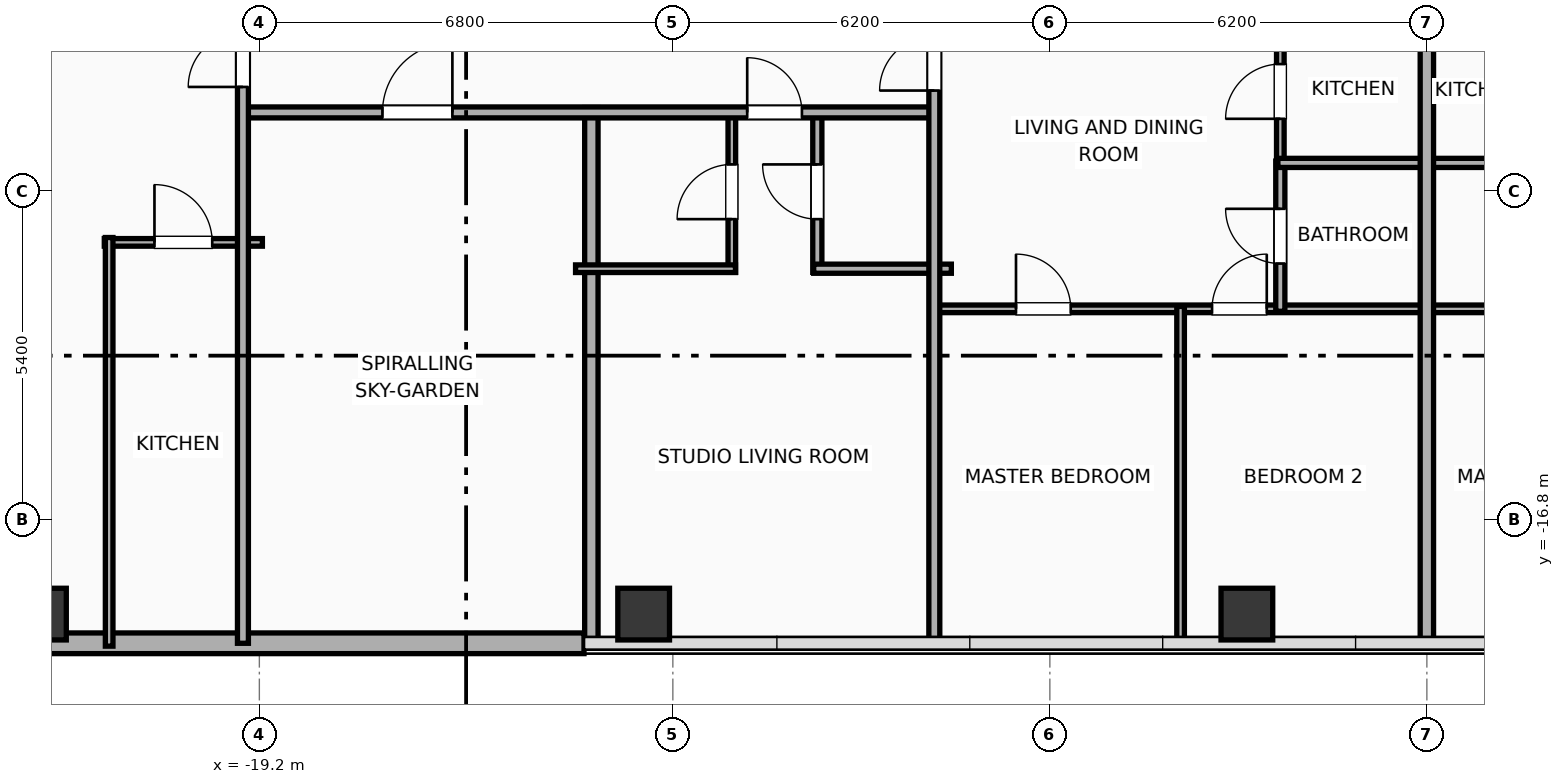
"""IFC4 building model, lengths in metres.
Left out: names, types, materials, properties, quantities, classifications, styles, units other than length and angle.
Written with IfcOpenShell. Run it as: python <this file> out.ifc"""

import sys

from ifc_helpers import new_model, si_unit, direction, frame, frame_2d, origin, origin_2d, place, context, subcontext, project, spatial, rectangle, hollow_rectangle, extrude, element, fill, save


model = new_model("IFC4")
c1 = context("Model", 3, precision=1e-05, world=origin(), true_north=direction((0.0, 1.0)))
c2 = subcontext(c1, "Body", "Model", "MODEL_VIEW")
j1 = project(units=[si_unit("LENGTHUNIT", "METRE"), si_unit("PLANEANGLEUNIT", "RADIAN")], contexts=[c1])
p1 = place(None, origin())
s1 = spatial("IfcSite", under=j1, at=p1, CompositionType="ELEMENT")
p2 = place(p1, origin())
s2 = spatial("IfcBuilding", under=s1, at=p2, CompositionType="ELEMENT")
p3 = place(p2, frame((0.0, 0.0, 200.2)))
s3 = spatial("IfcBuildingStorey", under=s2, at=p3, CompositionType="ELEMENT", Elevation=200.2)
for number, where, z_axis, x_axis in (
    (1, (-22.8, -18.35, 0.0), (0.0, 0.0, 1.0), (1.0, 0.0, 0.0)),
    (2, (-12.88, -18.35, 0.0), (0.0, 0.0, 1.0), (1.0, 0.0, 0.0)),
    (3, (-2.96, -18.35, 0.0), (0.0, 0.0, 1.0), (1.0, 0.0, 0.0)),
):
    element("IfcColumn", number, at=place(p3, frame(where, z_axis=z_axis, x_axis=x_axis)), inside=s3, PredefinedType="COLUMN", context=c2, shape_type="SweptSolid", body=[
        extrude(hollow_rectangle(XDim=0.85, YDim=0.85, WallThickness=0.028, at=origin_2d()), origin(), (0.0, 0.0, 1.0), 3.9),
    ])
p4 = place(p3, frame((-13.861, -18.83, 0.0), z_axis=(0.0, 0.0, 1.0), x_axis=(-1.0, 0.0, 0.0)))
e4 = element("IfcWall", 4, at=p4, inside=s3, PredefinedType="ELEMENTEDWALL", context=c2, shape_type="SweptSolid", body=[
    extrude(rectangle(XDim=8.922, YDim=0.34, at=frame_2d((4.461, 0.0))), origin(), (0.0, 0.0, 1.0), 2.54),
])
p5 = place(p3, frame((-13.74, -18.83, 0.0), z_axis=(0.0, 0.0, 1.0), x_axis=(0.0, 1.0, 0.0)))
e5 = element("IfcWall", 5, at=p5, inside=s3, PredefinedType="PARTITIONING", context=c2, shape_type="SweptSolid", body=[
    extrude(rectangle(XDim=8.81, YDim=0.22, at=frame_2d((4.405, 0.0))), origin(), (0.0, 0.0, 1.0), 3.65),
])
p6 = place(p3, frame((-11.43, -12.73, 0.0), z_axis=(0.0, 0.0, 1.0), x_axis=(0.0, 1.0, 0.0)))
e6 = element("IfcWall", 6, at=p6, inside=s3, PredefinedType="PARTITIONING", context=c2, shape_type="SweptSolid", body=[
    extrude(rectangle(XDim=2.65, YDim=0.125, at=frame_2d((1.325, 0.0))), origin(), (0.0, 0.0, 1.0), 3.65),
])
p7 = place(p6, frame((0.875, 0.0, 0.0)))
e7 = element("IfcOpeningElement", 7, at=p7, cuts=e6, PredefinedType="OPENING", context=c2, shape_type="SweptSolid", body=[
    extrude(rectangle(XDim=0.9, YDim=2.05, at=frame_2d((0.45, 1.025))), frame((0.0, 0.073, 0.0), z_axis=(0.0, -1.0, 0.0), x_axis=(1.0, 0.0, 0.0)), (0.0, 0.0, 1.0), 0.145),
])
p8 = place(p3, frame((-10.024, -12.73, 0.0), z_axis=(0.0, 0.0, 1.0), x_axis=(0.0, 1.0, 0.0)))
e8 = element("IfcWall", 8, at=p8, inside=s3, PredefinedType="PLUMBINGWALL", context=c2, shape_type="SweptSolid", body=[
    extrude(rectangle(XDim=2.65, YDim=0.15, at=frame_2d((1.325, 0.0))), origin(), (0.0, 0.0, 1.0), 3.65),
])
p9 = place(p8, frame((0.875, 0.0, 0.0)))
e9 = element("IfcOpeningElement", 9, at=p9, cuts=e8, PredefinedType="OPENING", context=c2, shape_type="SweptSolid", body=[
    extrude(rectangle(XDim=0.9, YDim=2.05, at=frame_2d((0.45, 1.025))), frame((0.0, 0.085, 0.0), z_axis=(0.0, -1.0, 0.0), x_axis=(1.0, 0.0, 0.0)), (0.0, 0.0, 1.0), 0.17),
])
p10 = place(p3, frame((-14.0, -12.67, 0.0), z_axis=(0.0, 0.0, 1.0), x_axis=(1.0, 0.0, 0.0)))
e10 = element("IfcWall", 10, at=p10, inside=s3, PredefinedType="PARTITIONING", context=c2, shape_type="SweptSolid", body=[
    extrude(rectangle(XDim=2.63, YDim=0.125, at=frame_2d((1.315, 0.0))), origin(), (0.0, 0.0, 1.0), 3.65),
])
p11 = place(p3, frame((-10.084, -12.67, 0.0), z_axis=(0.0, 0.0, 1.0), x_axis=(1.0, 0.0, 0.0)))
e11 = element("IfcWall", 11, at=p11, inside=s3, PredefinedType="PLUMBINGWALL", context=c2, shape_type="SweptSolid", body=[
    extrude(rectangle(XDim=2.264, YDim=0.15, at=frame_2d((1.132, 0.0))), origin(), (0.0, 0.0, 1.0), 3.65),
])
p12 = place(p3, frame((-19.5, -10.1, 0.0), z_axis=(0.0, 0.0, 1.0), x_axis=(1.0, 0.0, 0.0)))
e12 = element("IfcWall", 12, at=p12, inside=s3, PredefinedType="PARTITIONING", context=c2, shape_type="SweptSolid", body=[
    extrude(rectangle(XDim=11.42, YDim=0.18, at=frame_2d((5.71, 0.0))), origin(), (0.0, 0.0, 1.0), 3.65),
])
p13 = place(p12, frame((2.324, 0.0, 0.0)))
e13 = element("IfcOpeningElement", 13, at=p13, cuts=e12, PredefinedType="OPENING", context=c2, shape_type="SweptSolid", body=[
    extrude(rectangle(XDim=1.15, YDim=2.05, at=frame_2d((0.575, 1.025))), frame((0.0, 0.1, 0.0), z_axis=(0.0, -1.0, 0.0), x_axis=(1.0, 0.0, 0.0)), (0.0, 0.0, 1.0), 0.2),
])
p14 = place(p12, frame((8.323, 0.0, 0.0)))
e14 = element("IfcOpeningElement", 14, at=p14, cuts=e12, PredefinedType="OPENING", context=c2, shape_type="SweptSolid", body=[
    extrude(rectangle(XDim=0.9, YDim=2.05, at=frame_2d((0.45, 1.025))), frame((0.0, 0.1, 0.0), z_axis=(0.0, -1.0, 0.0), x_axis=(1.0, 0.0, 0.0)), (0.0, 0.0, 1.0), 0.2),
])
p15 = place(p3, frame((-8.08, -13.33, 0.0), z_axis=(0.0, 0.0, 1.0), x_axis=(1.0, 0.0, 0.0)))
e15 = element("IfcWall", 15, at=p15, inside=s3, PredefinedType="PARTITIONING", context=c2, shape_type="SweptSolid", body=[
    extrude(rectangle(XDim=8.06, YDim=0.125, at=frame_2d((4.03, 0.0))), origin(), (0.0, 0.0, 1.0), 3.65),
])
p16 = place(p15, frame((1.323, 0.0, 0.0)))
e16 = element("IfcOpeningElement", 16, at=p16, cuts=e15, PredefinedType="OPENING", context=c2, shape_type="SweptSolid", body=[
    extrude(rectangle(XDim=0.9, YDim=2.05, at=frame_2d((0.45, 1.025))), frame((0.0, 0.073, 0.0), z_axis=(0.0, -1.0, 0.0), x_axis=(1.0, 0.0, 0.0)), (0.0, 0.0, 1.0), 0.145),
])
p17 = place(p15, frame((4.547, 0.0, 0.0)))
e17 = element("IfcOpeningElement", 17, at=p17, cuts=e15, PredefinedType="OPENING", context=c2, shape_type="SweptSolid", body=[
    extrude(rectangle(XDim=0.9, YDim=2.05, at=frame_2d((0.45, 1.025))), frame((0.0, 0.073, 0.0), z_axis=(0.0, -1.0, 0.0), x_axis=(1.0, 0.0, 0.0)), (0.0, 0.0, 1.0), 0.145),
])
p18 = place(p3, frame((-2.41, -10.96, 0.0), z_axis=(0.0, 0.0, 1.0), x_axis=(0.0, 1.0, 0.0)))
e18 = element("IfcWall", 18, at=p18, inside=s3, PredefinedType="PARTITIONING", context=c2, shape_type="SweptSolid", body=[
    extrude(rectangle(XDim=2.41, YDim=0.125, at=frame_2d((1.205, 0.0))), origin(), (0.0, 0.0, 1.0), 3.65),
])
p19 = place(p18, frame((0.755, 0.0, 0.0)))
e19 = element("IfcOpeningElement", 19, at=p19, cuts=e18, PredefinedType="OPENING", context=c2, shape_type="SweptSolid", body=[
    extrude(rectangle(XDim=0.9, YDim=2.05, at=frame_2d((0.45, 1.025))), frame((0.0, 0.073, 0.0), z_axis=(0.0, -1.0, 0.0), x_axis=(1.0, 0.0, 0.0)), (0.0, 0.0, 1.0), 0.145),
])
p20 = place(p3, frame((-2.41, -13.37, 0.0), z_axis=(0.0, 0.0, 1.0), x_axis=(0.0, 1.0, 0.0)))
e20 = element("IfcWall", 20, at=p20, inside=s3, PredefinedType="PLUMBINGWALL", context=c2, shape_type="SweptSolid", body=[
    extrude(rectangle(XDim=2.47, YDim=0.15, at=frame_2d((1.235, 0.0))), origin(), (0.0, 0.0, 1.0), 3.65),
])
p21 = place(p20, frame((0.785, 0.0, 0.0)))
e21 = element("IfcOpeningElement", 21, at=p21, cuts=e20, PredefinedType="OPENING", context=c2, shape_type="SweptSolid", body=[
    extrude(rectangle(XDim=0.9, YDim=2.05, at=frame_2d((0.45, 1.025))), frame((0.0, 0.085, 0.0), z_axis=(0.0, -1.0, 0.0), x_axis=(1.0, 0.0, 0.0)), (0.0, 0.0, 1.0), 0.17),
])
p22 = place(p3, frame((-2.45, -10.93, 0.0), z_axis=(0.0, 0.0, 1.0), x_axis=(1.0, 0.0, 0.0)))
e22 = element("IfcWall", 22, at=p22, inside=s3, PredefinedType="PLUMBINGWALL", context=c2, shape_type="SweptSolid", body=[
    extrude(rectangle(XDim=2.43, YDim=0.15, at=frame_2d((1.215, 0.0))), origin(), (0.0, 0.0, 1.0), 3.65),
])
p23 = place(p3, frame((-4.05, -18.83, 0.0), z_axis=(0.0, 0.0, 1.0), x_axis=(0.0, 1.0, 0.0)))
e23 = element("IfcWall", 23, at=p23, inside=s3, PredefinedType="PARTITIONING", context=c2, shape_type="SweptSolid", body=[
    extrude(rectangle(XDim=5.54, YDim=0.125, at=frame_2d((2.77, 0.0))), origin(), (0.0, 0.0, 1.0), 2.54),
])
p24 = place(p3, frame((-8.1, -18.83, 0.0), z_axis=(0.0, 0.0, 1.0), x_axis=(0.0, 1.0, 0.0)))
e24 = element("IfcWall", 24, at=p24, inside=s3, PredefinedType="PARTITIONING", context=c2, shape_type="SweptSolid", body=[
    extrude(rectangle(XDim=10.34, YDim=0.18, at=frame_2d((5.17, 0.0))), origin(), (0.0, 0.0, 1.0), 3.65),
])
p25 = place(p24, frame((9.09, 0.0, 0.0)))
e25 = element("IfcOpeningElement", 25, at=p25, cuts=e24, PredefinedType="OPENING", context=c2, shape_type="SweptSolid", body=[
    extrude(rectangle(XDim=0.9, YDim=2.05, at=frame_2d((0.45, 1.025))), frame((0.0, 0.1, 0.0), z_axis=(0.0, -1.0, 0.0), x_axis=(1.0, 0.0, 0.0)), (0.0, 0.0, 1.0), 0.2),
])
p26 = place(p3, frame((0.02, -13.33, 0.0), z_axis=(0.0, 0.0, 1.0), x_axis=(1.0, 0.0, 0.0)))
e26 = element("IfcWall", 26, at=p26, inside=s3, PredefinedType="PARTITIONING", context=c2, shape_type="SweptSolid", body=[
    extrude(rectangle(XDim=8.06, YDim=0.125, at=frame_2d((4.03, 0.0))), origin(), (0.0, 0.0, 1.0), 3.65),
])
p27 = place(p26, frame((1.323, 0.0, 0.0)))
e27 = element("IfcOpeningElement", 27, at=p27, cuts=e26, PredefinedType="OPENING", context=c2, shape_type="SweptSolid", body=[
    extrude(rectangle(XDim=0.9, YDim=2.05, at=frame_2d((0.45, 1.025))), frame((0.0, 0.073, 0.0), z_axis=(0.0, -1.0, 0.0), x_axis=(1.0, 0.0, 0.0)), (0.0, 0.0, 1.0), 0.145),
])
p28 = place(p26, frame((5.837, 0.0, 0.0)))
e28 = element("IfcOpeningElement", 28, at=p28, cuts=e26, PredefinedType="OPENING", context=c2, shape_type="SweptSolid", body=[
    extrude(rectangle(XDim=0.9, YDim=2.05, at=frame_2d((0.45, 1.025))), frame((0.0, 0.073, 0.0), z_axis=(0.0, -1.0, 0.0), x_axis=(1.0, 0.0, 0.0)), (0.0, 0.0, 1.0), 0.145),
])
p29 = place(p3, frame((0.02, -10.93, 0.0), z_axis=(0.0, 0.0, 1.0), x_axis=(1.0, 0.0, 0.0)))
e29 = element("IfcWall", 29, at=p29, inside=s3, PredefinedType="PLUMBINGWALL", context=c2, shape_type="SweptSolid", body=[
    extrude(rectangle(XDim=2.43, YDim=0.15, at=frame_2d((1.215, 0.0))), origin(), (0.0, 0.0, 1.0), 3.65),
])
p30 = place(p3, frame((0.0, -18.83, 0.0), z_axis=(0.0, 0.0, 1.0), x_axis=(0.0, 1.0, 0.0)))
e30 = element("IfcWall", 30, at=p30, inside=s3, PredefinedType="PARTITIONING", context=c2, shape_type="SweptSolid", body=[
    extrude(rectangle(XDim=10.34, YDim=0.22, at=frame_2d((5.17, 0.0))), origin(), (0.0, 0.0, 1.0), 3.65),
])
p31 = place(p3, frame((-21.75, -12.237, 0.0), z_axis=(0.0, 0.0, 1.0), x_axis=(1.0, 0.0, 0.0)))
e31 = element("IfcWall", 31, at=p31, inside=s3, PredefinedType="PARTITIONING", context=c2, shape_type="SweptSolid", body=[
    extrude(rectangle(XDim=2.6, YDim=0.125, at=frame_2d((1.3, 0.0))), origin(), (0.0, 0.0, 1.0), 3.65),
])
p32 = place(p31, frame((0.825, 0.0, 0.0)))
e32 = element("IfcOpeningElement", 32, at=p32, cuts=e31, PredefinedType="OPENING", context=c2, shape_type="SweptSolid", body=[
    extrude(rectangle(XDim=0.95, YDim=2.05, at=frame_2d((0.475, 1.025))), frame((0.0, 0.073, 0.0), z_axis=(0.0, -1.0, 0.0), x_axis=(1.0, 0.0, 0.0)), (0.0, 0.0, 1.0), 0.145),
])
p33 = place(p3, frame((-21.67, -18.877, 0.0), z_axis=(0.0, 0.0, 1.0), x_axis=(0.0, 1.0, 0.0)))
e33 = element("IfcWall", 33, at=p33, inside=s3, PredefinedType="PARTITIONING", context=c2, shape_type="SweptSolid", body=[
    extrude(rectangle(XDim=6.72, YDim=0.125, at=frame_2d((3.36, 0.0))), origin(), (0.0, 0.0, 1.0), 2.54),
])
p34 = place(p3, frame((-19.47, -18.83, 0.0), z_axis=(0.0, 0.0, 1.0), x_axis=(0.0, 1.0, 0.0)))
e34 = element("IfcWall", 34, at=p34, inside=s3, PredefinedType="PARTITIONING", context=c2, shape_type="SweptSolid", body=[
    extrude(rectangle(XDim=20.63, YDim=0.18, at=frame_2d((10.315, 0.0))), origin(), (0.0, 0.0, 1.0), 2.54),
])
p35 = place(p34, frame((9.149, 0.0, 0.0)))
e35 = element("IfcOpeningElement", 35, at=p35, cuts=e34, PredefinedType="OPENING", context=c2, shape_type="SweptSolid", body=[
    extrude(rectangle(XDim=0.9, YDim=2.05, at=frame_2d((0.45, 1.025))), frame((0.0, 0.1, 0.0), z_axis=(0.0, -1.0, 0.0), x_axis=(1.0, 0.0, 0.0)), (0.0, 0.0, 1.0), 0.2),
])
p36 = place(p7, origin())
e36 = element("IfcDoor", 36, at=p36, inside=s3, OperationType="SINGLE_SWING_LEFT", PredefinedType="DOOR", context=c2, shape_type="SweptSolid", body=[
    extrude(rectangle(XDim=0.9, YDim=2.05, at=frame_2d((0.45, 1.025))), frame((0.0, 0.025, 0.0), z_axis=(0.0, -1.0, 0.0), x_axis=(1.0, 0.0, 0.0)), (0.0, 0.0, 1.0), 0.05),
])
fill(e7, e36)
p37 = place(p9, origin())
e37 = element("IfcDoor", 37, at=p37, inside=s3, OperationType="SINGLE_SWING_RIGHT", PredefinedType="DOOR", context=c2, shape_type="SweptSolid", body=[
    extrude(rectangle(XDim=0.9, YDim=2.05, at=frame_2d((0.45, 1.025))), frame((0.0, 0.025, 0.0), z_axis=(0.0, -1.0, 0.0), x_axis=(1.0, 0.0, 0.0)), (0.0, 0.0, 1.0), 0.05),
])
fill(e9, e37)
p38 = place(p13, origin())
e38 = element("IfcDoor", 38, at=p38, inside=s3, OperationType="SINGLE_SWING_RIGHT", PredefinedType="DOOR", context=c2, shape_type="SweptSolid", body=[
    extrude(rectangle(XDim=1.15, YDim=2.05, at=frame_2d((0.575, 1.025))), frame((0.0, 0.025, 0.0), z_axis=(0.0, -1.0, 0.0), x_axis=(1.0, 0.0, 0.0)), (0.0, 0.0, 1.0), 0.05),
])
fill(e13, e38)
p39 = place(p14, origin())
e39 = element("IfcDoor", 39, at=p39, inside=s3, OperationType="SINGLE_SWING_LEFT", PredefinedType="DOOR", context=c2, shape_type="SweptSolid", body=[
    extrude(rectangle(XDim=0.9, YDim=2.05, at=frame_2d((0.45, 1.025))), frame((0.0, 0.025, 0.0), z_axis=(0.0, -1.0, 0.0), x_axis=(1.0, 0.0, 0.0)), (0.0, 0.0, 1.0), 0.05),
])
fill(e14, e39)
p40 = place(p16, origin())
e40 = element("IfcDoor", 40, at=p40, inside=s3, OperationType="SINGLE_SWING_LEFT", PredefinedType="DOOR", context=c2, shape_type="SweptSolid", body=[
    extrude(rectangle(XDim=0.9, YDim=2.05, at=frame_2d((0.45, 1.025))), frame((0.0, 0.025, 0.0), z_axis=(0.0, -1.0, 0.0), x_axis=(1.0, 0.0, 0.0)), (0.0, 0.0, 1.0), 0.05),
])
fill(e16, e40)
p41 = place(p17, origin())
e41 = element("IfcDoor", 41, at=p41, inside=s3, OperationType="SINGLE_SWING_RIGHT", PredefinedType="DOOR", context=c2, shape_type="SweptSolid", body=[
    extrude(rectangle(XDim=0.9, YDim=2.05, at=frame_2d((0.45, 1.025))), frame((0.0, 0.025, 0.0), z_axis=(0.0, -1.0, 0.0), x_axis=(1.0, 0.0, 0.0)), (0.0, 0.0, 1.0), 0.05),
])
fill(e17, e41)
p42 = place(p19, origin())
e42 = element("IfcDoor", 42, at=p42, inside=s3, OperationType="SINGLE_SWING_LEFT", PredefinedType="DOOR", context=c2, shape_type="SweptSolid", body=[
    extrude(rectangle(XDim=0.9, YDim=2.05, at=frame_2d((0.45, 1.025))), frame((0.0, 0.025, 0.0), z_axis=(0.0, -1.0, 0.0), x_axis=(1.0, 0.0, 0.0)), (0.0, 0.0, 1.0), 0.05),
])
fill(e19, e42)
p43 = place(p21, origin())
e43 = element("IfcDoor", 43, at=p43, inside=s3, OperationType="SINGLE_SWING_RIGHT", PredefinedType="DOOR", context=c2, shape_type="SweptSolid", body=[
    extrude(rectangle(XDim=0.9, YDim=2.05, at=frame_2d((0.45, 1.025))), frame((0.0, 0.025, 0.0), z_axis=(0.0, -1.0, 0.0), x_axis=(1.0, 0.0, 0.0)), (0.0, 0.0, 1.0), 0.05),
])
fill(e21, e43)
p44 = place(p25, origin())
e44 = element("IfcDoor", 44, at=p44, inside=s3, OperationType="SINGLE_SWING_LEFT", PredefinedType="DOOR", context=c2, shape_type="SweptSolid", body=[
    extrude(rectangle(XDim=0.9, YDim=2.05, at=frame_2d((0.45, 1.025))), frame((0.0, 0.025, 0.0), z_axis=(0.0, -1.0, 0.0), x_axis=(1.0, 0.0, 0.0)), (0.0, 0.0, 1.0), 0.05),
])
fill(e25, e44)
p45 = place(p32, origin())
e45 = element("IfcDoor", 45, at=p45, inside=s3, OperationType="SINGLE_SWING_LEFT", PredefinedType="DOOR", context=c2, shape_type="SweptSolid", body=[
    extrude(rectangle(XDim=0.95, YDim=2.05, at=frame_2d((0.475, 1.025))), frame((0.0, 0.025, 0.0), z_axis=(0.0, -1.0, 0.0), x_axis=(1.0, 0.0, 0.0)), (0.0, 0.0, 1.0), 0.05),
])
fill(e32, e45)
p46 = place(p35, origin())
e46 = element("IfcDoor", 46, at=p46, inside=s3, OperationType="SINGLE_SWING_LEFT", PredefinedType="DOOR", context=c2, shape_type="SweptSolid", body=[
    extrude(rectangle(XDim=0.9, YDim=2.05, at=frame_2d((0.45, 1.025))), frame((0.0, 0.025, 0.0), z_axis=(0.0, -1.0, 0.0), x_axis=(1.0, 0.0, 0.0)), (0.0, 0.0, 1.0), 0.05),
])
fill(e35, e46)
save(model, sys.argv[1])
